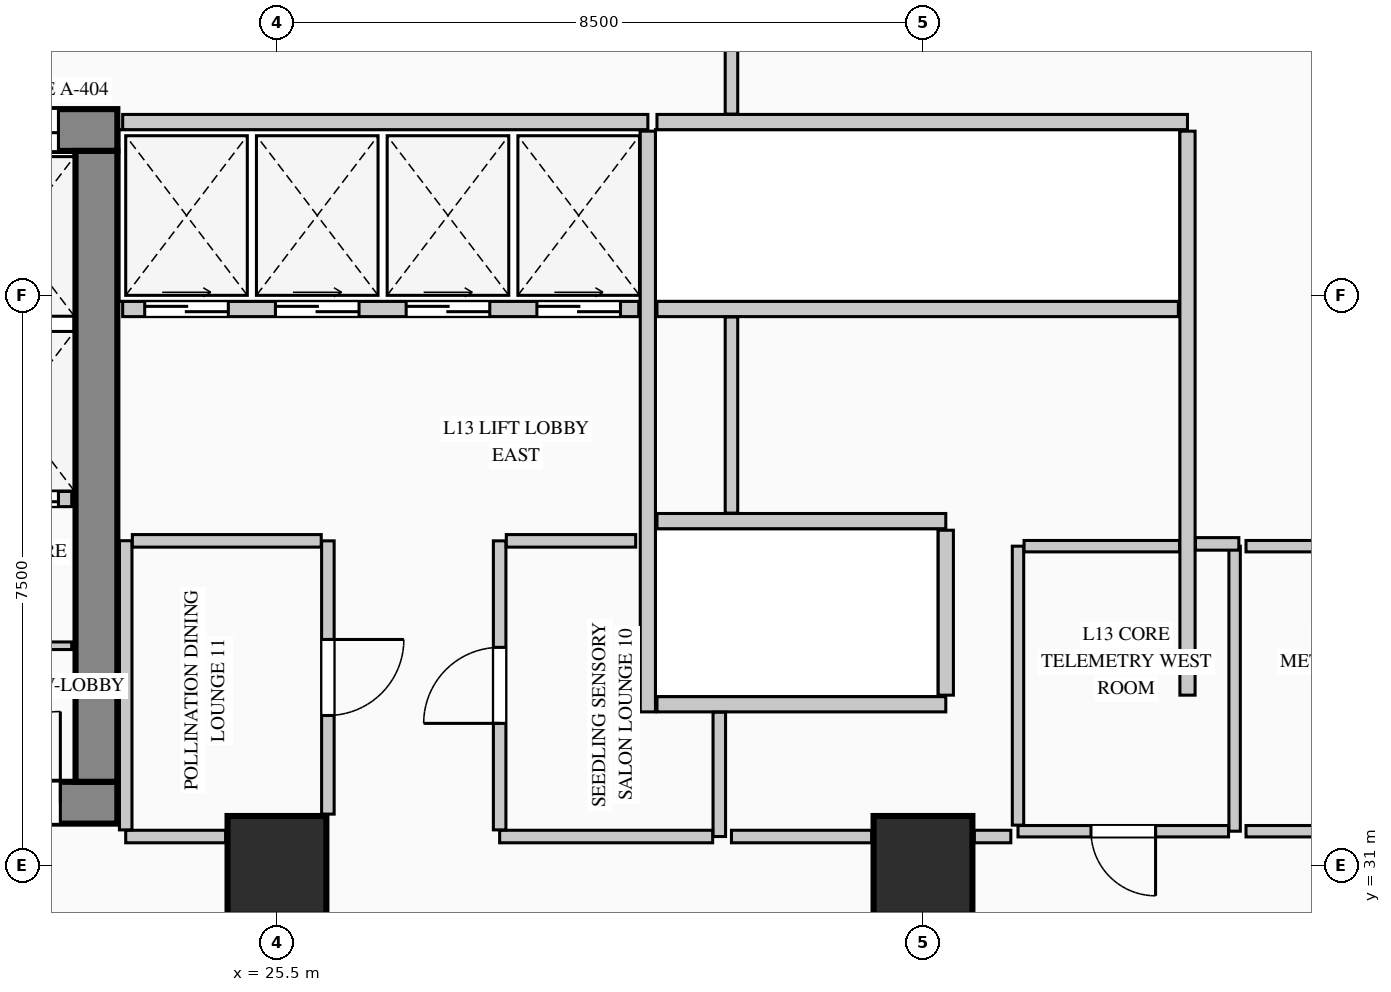
"""IFC4 building model, lengths in metres.
Left out: names, types, materials, properties, quantities, classifications, styles, units other than length and angle.
Written with IfcOpenShell. Run it as: python <this file> out.ifc"""

import sys

from ifc_helpers import new_model, si_unit, direction, frame, frame_2d, origin, origin_2d, place, context, subcontext, project, spatial, rectangle, extrude, element, fill, save


model = new_model("IFC4")
c1 = context("Model", 3, precision=1e-05, world=origin(), true_north=direction((0.0, 1.0)))
c2 = subcontext(c1, "Body", "Model", "MODEL_VIEW")
j1 = project(units=[si_unit("LENGTHUNIT", "METRE"), si_unit("PLANEANGLEUNIT", "RADIAN")], contexts=[c1])
p1 = place(None, origin())
s1 = spatial("IfcSite", under=j1, at=p1, CompositionType="ELEMENT")
p2 = place(p1, origin())
s2 = spatial("IfcBuilding", under=s1, at=p2, CompositionType="ELEMENT")
p3 = place(p2, frame((0.0, 0.0, 57.8)))
s3 = spatial("IfcBuildingStorey", under=s2, at=p3, CompositionType="ELEMENT", Elevation=57.8)
p4 = place(p3, frame((5.45, 40.675, 0.0), z_axis=(0.0, 0.0, 1.0), x_axis=(1.0, 0.0, 0.0)))
e1 = element("IfcWall", 1, at=p4, inside=s3, PredefinedType="SHEAR", context=c2, shape_type="SweptSolid", body=[
    extrude(rectangle(XDim=17.95, YDim=0.55, at=frame_2d((8.975, 0.0))), origin(), (0.0, 0.0, 1.0), 4.4),
])
p5 = place(p4, frame((15.995, 0.0, 0.0)))
e2 = element("IfcOpeningElement", 2, at=p5, cuts=e1, PredefinedType="OPENING", context=c2, shape_type="SweptSolid", body=[
    extrude(rectangle(XDim=1.18, YDim=2.25, at=frame_2d((0.59, 1.125))), frame((0.0, 0.285, 0.0), z_axis=(0.0, -1.0, 0.0), x_axis=(1.0, 0.0, 0.0)), (0.0, 0.0, 1.0), 0.57),
])
p6 = place(p3, frame((5.45, 31.825, 0.0), z_axis=(0.0, 0.0, 1.0), x_axis=(1.0, 0.0, 0.0)))
e3 = element("IfcWall", 3, at=p6, inside=s3, PredefinedType="SHEAR", context=c2, shape_type="SweptSolid", body=[
    extrude(rectangle(XDim=17.95, YDim=0.55, at=frame_2d((8.975, 0.0))), origin(), (0.0, 0.0, 1.0), 4.4),
])
p7 = place(p6, frame((3.2, 0.0, 0.0)))
e4 = element("IfcOpeningElement", 4, at=p7, cuts=e3, PredefinedType="OPENING", context=c2, shape_type="SweptSolid", body=[
    extrude(rectangle(XDim=1.2, YDim=2.2, at=frame_2d((0.6, 1.1))), frame((0.0, 0.285, 0.0), z_axis=(0.0, -1.0, 0.0), x_axis=(1.0, 0.0, 0.0)), (0.0, 0.0, 1.0), 0.57),
])
p8 = place(p6, frame((7.05, 0.0, 0.0)))
e5 = element("IfcOpeningElement", 5, at=p8, cuts=e3, PredefinedType="OPENING", context=c2, shape_type="SweptSolid", body=[
    extrude(rectangle(XDim=1.2, YDim=2.2, at=frame_2d((0.6, 1.1))), frame((0.0, 0.285, 0.0), z_axis=(0.0, -1.0, 0.0), x_axis=(1.0, 0.0, 0.0)), (0.0, 0.0, 1.0), 0.57),
])
p9 = place(p6, frame((8.9, 0.0, 0.0)))
e6 = element("IfcOpeningElement", 6, at=p9, cuts=e3, PredefinedType="OPENING", context=c2, shape_type="SweptSolid", body=[
    extrude(rectangle(XDim=1.15, YDim=2.2, at=frame_2d((0.575, 1.1))), frame((0.0, 0.285, 0.0), z_axis=(0.0, -1.0, 0.0), x_axis=(1.0, 0.0, 0.0)), (0.0, 0.0, 1.0), 0.57),
])
p10 = place(p6, frame((16.0, 0.0, 0.0)))
e7 = element("IfcOpeningElement", 7, at=p10, cuts=e3, PredefinedType="OPENING", context=c2, shape_type="SweptSolid", body=[
    extrude(rectangle(XDim=1.2, YDim=2.2, at=frame_2d((0.6, 1.1))), frame((0.0, 0.285, 0.0), z_axis=(0.0, -1.0, 0.0), x_axis=(1.0, 0.0, 0.0)), (0.0, 0.0, 1.0), 0.57),
])
p11 = place(p3, frame((23.125, 32.1, 0.0), z_axis=(0.0, 0.0, 1.0), x_axis=(0.0, 1.0, 0.0)))
e8 = element("IfcWall", 8, at=p11, inside=s3, PredefinedType="SHEAR", context=c2, shape_type="SweptSolid", body=[
    extrude(rectangle(XDim=8.3, YDim=0.55, at=frame_2d((4.15, 0.0))), origin(), (0.0, 0.0, 1.0), 4.4),
])
for number, where, z_axis, x_axis in (
    (9, (25.5, 31.0, 0.0), (0.0, 0.0, 1.0), (1.0, 0.0, 0.0)),
    (10, (34.0, 31.0, 0.0), (0.0, 0.0, 1.0), (1.0, 0.0, 0.0)),
):
    element("IfcColumn", number, at=place(p3, frame(where, z_axis=z_axis, x_axis=x_axis)), inside=s3, PredefinedType="COLUMN", context=c2, shape_type="SweptSolid", body=[
        extrude(rectangle(XDim=1.3, YDim=1.3, at=origin_2d()), origin(), (0.0, 0.0, 1.0), 4.4),
    ])
p12 = place(p3, frame((21.38, 33.89, 0.0), z_axis=(0.0, 0.0, 1.0), x_axis=(1.0, 0.0, 0.0)))
e11 = element("IfcWall", 11, at=p12, inside=s3, PredefinedType="PARTITIONING", context=c2, shape_type="SweptSolid", body=[
    extrude(rectangle(XDim=1.42, YDim=0.1, at=frame_2d((0.71, 0.0))), origin(), (0.0, 0.0, 1.0), 4.1),
])
p13 = place(p12, frame((0.28, 0.0, 0.0)))
e12 = element("IfcOpeningElement", 12, at=p13, cuts=e11, PredefinedType="OPENING", context=c2, shape_type="SweptSolid", body=[
    extrude(rectangle(XDim=0.85, YDim=2.1, at=frame_2d((0.425, 1.05))), frame((0.0, 0.06, 0.0), z_axis=(0.0, -1.0, 0.0), x_axis=(1.0, 0.0, 0.0)), (0.0, 0.0, 1.0), 0.12),
])
p14 = place(p3, frame((21.3, 35.82, 0.0), z_axis=(0.0, 0.0, 1.0), x_axis=(1.0, 0.0, 0.0)))
e13 = element("IfcWall", 13, at=p14, inside=s3, PredefinedType="PARTITIONING", context=c2, shape_type="SweptSolid", body=[
    extrude(rectangle(XDim=1.5, YDim=0.2, at=frame_2d((0.75, 0.0))), origin(), (0.0, 0.0, 1.0), 4.1),
])
p15 = place(p14, frame((0.145, 0.0, 0.0)))
e14 = element("IfcOpeningElement", 14, at=p15, cuts=e13, PredefinedType="OPENING", context=c2, shape_type="SweptSolid", body=[
    extrude(rectangle(XDim=1.18, YDim=2.25, at=frame_2d((0.59, 1.125))), frame((0.0, 0.11, 0.0), z_axis=(0.0, -1.0, 0.0), x_axis=(1.0, 0.0, 0.0)), (0.0, 0.0, 1.0), 0.22),
])
p16 = place(p3, frame((23.47, 40.78, 0.0), z_axis=(0.0, 0.0, 1.0), x_axis=(1.0, 0.0, 0.0)))
e15 = element("IfcWall", 15, at=p16, inside=s3, PredefinedType="PARTITIONING", context=c2, shape_type="SweptSolid", body=[
    extrude(rectangle(XDim=6.91, YDim=0.2, at=frame_2d((3.455, 0.0))), origin(), (0.0, 0.0, 1.0), 4.1),
])
p17 = place(p3, frame((30.38, 33.02, 0.0), z_axis=(0.0, 0.0, 1.0), x_axis=(0.0, 1.0, 0.0)))
e16 = element("IfcWall", 16, at=p17, inside=s3, PredefinedType="PARTITIONING", context=c2, shape_type="SweptSolid", body=[
    extrude(rectangle(XDim=7.64, YDim=0.2, at=frame_2d((3.82, 0.0))), origin(), (0.0, 0.0, 1.0), 4.1),
])
p18 = place(p3, frame((23.47, 38.32, 0.0), z_axis=(0.0, 0.0, 1.0), x_axis=(1.0, 0.0, 0.0)))
e17 = element("IfcWall", 17, at=p18, inside=s3, PredefinedType="PARTITIONING", context=c2, shape_type="SweptSolid", body=[
    extrude(rectangle(XDim=6.79, YDim=0.2, at=frame_2d((3.395, 0.0))), origin(), (0.0, 0.0, 1.0), 4.1),
])
p19 = place(p18, frame((0.29, 0.0, 0.0)))
e18 = element("IfcOpeningElement", 18, at=p19, cuts=e17, PredefinedType="OPENING", context=c2, shape_type="SweptSolid", body=[
    extrude(rectangle(XDim=1.1, YDim=2.2, at=frame_2d((0.55, 1.1))), frame((0.0, 0.11, 0.0), z_axis=(0.0, -1.0, 0.0), x_axis=(1.0, 0.0, 0.0)), (0.0, 0.0, 1.0), 0.22),
])
p20 = place(p18, frame((2.01, 0.0, 0.0)))
e19 = element("IfcOpeningElement", 19, at=p20, cuts=e17, PredefinedType="OPENING", context=c2, shape_type="SweptSolid", body=[
    extrude(rectangle(XDim=1.1, YDim=2.2, at=frame_2d((0.55, 1.1))), frame((0.0, 0.11, 0.0), z_axis=(0.0, -1.0, 0.0), x_axis=(1.0, 0.0, 0.0)), (0.0, 0.0, 1.0), 0.22),
])
p21 = place(p18, frame((3.73, 0.0, 0.0)))
e20 = element("IfcOpeningElement", 20, at=p21, cuts=e17, PredefinedType="OPENING", context=c2, shape_type="SweptSolid", body=[
    extrude(rectangle(XDim=1.1, YDim=2.2, at=frame_2d((0.55, 1.1))), frame((0.0, 0.11, 0.0), z_axis=(0.0, -1.0, 0.0), x_axis=(1.0, 0.0, 0.0)), (0.0, 0.0, 1.0), 0.22),
])
p22 = place(p18, frame((5.45, 0.0, 0.0)))
e21 = element("IfcOpeningElement", 21, at=p22, cuts=e17, PredefinedType="OPENING", context=c2, shape_type="SweptSolid", body=[
    extrude(rectangle(XDim=1.1, YDim=2.2, at=frame_2d((0.55, 1.1))), frame((0.0, 0.11, 0.0), z_axis=(0.0, -1.0, 0.0), x_axis=(1.0, 0.0, 0.0)), (0.0, 0.0, 1.0), 0.22),
])
p23 = place(p3, frame((30.5, 40.78, 0.0), z_axis=(0.0, 0.0, 1.0), x_axis=(1.0, 0.0, 0.0)))
e22 = element("IfcWall", 22, at=p23, inside=s3, PredefinedType="PARTITIONING", context=c2, shape_type="SweptSolid", body=[
    extrude(rectangle(XDim=6.98, YDim=0.2, at=frame_2d((3.49, 0.0))), origin(), (0.0, 0.0, 1.0), 4.1),
])
p24 = place(p3, frame((37.48, 33.24, 0.0), z_axis=(0.0, 0.0, 1.0), x_axis=(0.0, 1.0, 0.0)))
e23 = element("IfcWall", 23, at=p24, inside=s3, PredefinedType="PARTITIONING", context=c2, shape_type="SweptSolid", body=[
    extrude(rectangle(XDim=7.42, YDim=0.2, at=frame_2d((3.71, 0.0))), origin(), (0.0, 0.0, 1.0), 4.1),
])
p25 = place(p3, frame((30.5, 38.32, 0.0), z_axis=(0.0, 0.0, 1.0), x_axis=(1.0, 0.0, 0.0)))
e24 = element("IfcWall", 24, at=p25, inside=s3, PredefinedType="PARTITIONING", context=c2, shape_type="SweptSolid", body=[
    extrude(rectangle(XDim=6.86, YDim=0.2, at=frame_2d((3.43, 0.0))), origin(), (0.0, 0.0, 1.0), 4.1),
])
for number, where, z_axis, x_axis in (
    (25, (30.5, 35.53, 0.0), (0.0, 0.0, 1.0), (1.0, 0.0, 0.0)),
    (26, (30.5, 33.12, 0.0), (0.0, 0.0, 1.0), (1.0, 0.0, 0.0)),
):
    element("IfcWall", number, at=place(p3, frame(where, z_axis=z_axis, x_axis=x_axis)), inside=s3, PredefinedType="PARTITIONING", context=c2, shape_type="SweptSolid", body=[
        extrude(rectangle(XDim=3.8, YDim=0.2, at=frame_2d((1.9, 0.0))), origin(), (0.0, 0.0, 1.0), 4.1),
    ])
p26 = place(p3, frame((34.3, 33.24, 0.0), z_axis=(0.0, 0.0, 1.0), x_axis=(0.0, 1.0, 0.0)))
e27 = element("IfcWall", 27, at=p26, inside=s3, PredefinedType="PARTITIONING", context=c2, shape_type="SweptSolid", body=[
    extrude(rectangle(XDim=2.17, YDim=0.2, at=frame_2d((1.085, 0.0))), origin(), (0.0, 0.0, 1.0), 4.1),
])
p27 = place(p3, frame((38.1, 35.2, 0.0), z_axis=(0.0, 0.0, 1.0), x_axis=(0.0, -1.0, 0.0)))
e28 = element("IfcWall", 28, at=p27, inside=s3, PredefinedType="PARTITIONING", context=c2, shape_type="SweptSolid", body=[
    extrude(rectangle(XDim=3.75, YDim=0.15, at=frame_2d((1.875, 0.0))), origin(), (0.0, 0.0, 1.0), 4.1),
])
p28 = place(p3, frame((38.02, 31.45, 0.0), z_axis=(0.0, 0.0, 1.0), x_axis=(-1.0, 0.0, 0.0)))
e29 = element("IfcWall", 29, at=p28, inside=s3, PredefinedType="PARTITIONING", context=c2, shape_type="SweptSolid", body=[
    extrude(rectangle(XDim=2.77, YDim=0.15, at=frame_2d((1.385, 0.0))), origin(), (0.0, 0.0, 1.0), 4.1),
])
p29 = place(p28, frame((0.96, 0.0, 0.0)))
e30 = element("IfcOpeningElement", 30, at=p29, cuts=e29, PredefinedType="OPENING", context=c2, shape_type="SweptSolid", body=[
    extrude(rectangle(XDim=0.85, YDim=2.1, at=frame_2d((0.425, 1.05))), frame((0.0, 0.085, 0.0), z_axis=(0.0, -1.0, 0.0), x_axis=(1.0, 0.0, 0.0)), (0.0, 0.0, 1.0), 0.17),
])
p30 = place(p3, frame((35.25, 31.53, 0.0), z_axis=(0.0, 0.0, 1.0), x_axis=(0.0, 1.0, 0.0)))
e31 = element("IfcWall", 31, at=p30, inside=s3, PredefinedType="PARTITIONING", context=c2, shape_type="SweptSolid", body=[
    extrude(rectangle(XDim=3.67, YDim=0.15, at=frame_2d((1.835, 0.0))), origin(), (0.0, 0.0, 1.0), 4.1),
])
p31 = place(p3, frame((35.33, 35.2, 0.0), z_axis=(0.0, 0.0, 1.0), x_axis=(1.0, 0.0, 0.0)))
e32 = element("IfcWall", 32, at=p31, inside=s3, PredefinedType="PARTITIONING", context=c2, shape_type="SweptSolid", body=[
    extrude(rectangle(XDim=2.045, YDim=0.15, at=frame_2d((1.022, 0.0))), origin(), (0.0, 0.0, 1.0), 4.1),
])
p32 = place(p3, frame((41.07, 31.45, 0.0), z_axis=(0.0, 0.0, 1.0), x_axis=(-1.0, 0.0, 0.0)))
e33 = element("IfcWall", 33, at=p32, inside=s3, PredefinedType="PARTITIONING", context=c2, shape_type="SweptSolid", body=[
    extrude(rectangle(XDim=2.82, YDim=0.15, at=frame_2d((1.41, 0.0))), origin(), (0.0, 0.0, 1.0), 4.1),
])
p33 = place(p32, frame((0.985, 0.0, 0.0)))
e34 = element("IfcOpeningElement", 34, at=p33, cuts=e33, PredefinedType="OPENING", context=c2, shape_type="SweptSolid", body=[
    extrude(rectangle(XDim=0.85, YDim=2.1, at=frame_2d((0.425, 1.05))), frame((0.0, 0.085, 0.0), z_axis=(0.0, -1.0, 0.0), x_axis=(1.0, 0.0, 0.0)), (0.0, 0.0, 1.0), 0.17),
])
p34 = place(p3, frame((38.25, 35.2, 0.0), z_axis=(0.0, 0.0, 1.0), x_axis=(1.0, 0.0, 0.0)))
e35 = element("IfcWall", 35, at=p34, inside=s3, PredefinedType="PARTITIONING", context=c2, shape_type="SweptSolid", body=[
    extrude(rectangle(XDim=2.82, YDim=0.15, at=frame_2d((1.41, 0.0))), origin(), (0.0, 0.0, 1.0), 4.1),
])
p35 = place(p3, frame((31.32, 33.015, 0.0), z_axis=(0.0, 0.0, 1.0), x_axis=(0.0, -1.0, 0.0)))
e36 = element("IfcWall", 36, at=p35, inside=s3, PredefinedType="PARTITIONING", context=c2, shape_type="SweptSolid", body=[
    extrude(rectangle(XDim=1.635, YDim=0.165, at=frame_2d((0.817, 0.0))), origin(), (0.0, 0.0, 1.0), 4.1),
])
p36 = place(p3, frame((31.232, 31.38, 0.0), z_axis=(0.0, 0.0, 1.0), x_axis=(-1.0, 0.0, 0.0)))
e37 = element("IfcWall", 37, at=p36, inside=s3, PredefinedType="PARTITIONING", context=c2, shape_type="SweptSolid", body=[
    extrude(rectangle(XDim=2.802, YDim=0.165, at=frame_2d((1.401, 0.0))), origin(), (0.0, 0.0, 1.0), 4.1),
])
p37 = place(p3, frame((28.43, 31.468, 0.0), z_axis=(0.0, 0.0, 1.0), x_axis=(0.0, 1.0, 0.0)))
e38 = element("IfcWall", 38, at=p37, inside=s3, PredefinedType="PARTITIONING", context=c2, shape_type="SweptSolid", body=[
    extrude(rectangle(XDim=3.802, YDim=0.165, at=frame_2d((1.901, 0.0))), origin(), (0.0, 0.0, 1.0), 4.1),
])
p38 = place(p37, frame((1.401, 0.0, 0.0)))
e39 = element("IfcOpeningElement", 39, at=p38, cuts=e38, PredefinedType="OPENING", context=c2, shape_type="SweptSolid", body=[
    extrude(rectangle(XDim=1.0, YDim=2.15, at=frame_2d((0.5, 1.075))), frame((0.0, 0.093, 0.0), z_axis=(0.0, -1.0, 0.0), x_axis=(1.0, 0.0, 0.0)), (0.0, 0.0, 1.0), 0.185),
])
p39 = place(p3, frame((28.518, 35.27, 0.0), z_axis=(0.0, 0.0, 1.0), x_axis=(1.0, 0.0, 0.0)))
e40 = element("IfcWall", 40, at=p39, inside=s3, PredefinedType="PARTITIONING", context=c2, shape_type="SweptSolid", body=[
    extrude(rectangle(XDim=1.702, YDim=0.165, at=frame_2d((0.851, 0.0))), origin(), (0.0, 0.0, 1.0), 4.1),
])
p40 = place(p3, frame((26.17, 35.27, 0.0), z_axis=(0.0, 0.0, 1.0), x_axis=(0.0, -1.0, 0.0)))
e41 = element("IfcWall", 41, at=p40, inside=s3, PredefinedType="PARTITIONING", context=c2, shape_type="SweptSolid", body=[
    extrude(rectangle(XDim=3.595, YDim=0.165, at=frame_2d((1.797, 0.0))), origin(), (0.0, 0.0, 1.0), 4.1),
])
p41 = place(p40, frame((1.298, 0.0, 0.0)))
e42 = element("IfcOpeningElement", 42, at=p41, cuts=e41, PredefinedType="OPENING", context=c2, shape_type="SweptSolid", body=[
    extrude(rectangle(XDim=1.0, YDim=2.15, at=frame_2d((0.5, 1.075))), frame((0.0, 0.093, 0.0), z_axis=(0.0, -1.0, 0.0), x_axis=(1.0, 0.0, 0.0)), (0.0, 0.0, 1.0), 0.185),
])
p42 = place(p3, frame((24.825, 31.38, 0.0), z_axis=(0.0, 0.0, 1.0), x_axis=(-1.0, 0.0, 0.0)))
e43 = element("IfcWall", 43, at=p42, inside=s3, PredefinedType="PARTITIONING", context=c2, shape_type="SweptSolid", body=[
    extrude(rectangle(XDim=1.315, YDim=0.165, at=frame_2d((0.657, 0.0))), origin(), (0.0, 0.0, 1.0), 4.1),
])
p43 = place(p3, frame((23.51, 31.468, 0.0), z_axis=(0.0, 0.0, 1.0), x_axis=(0.0, 1.0, 0.0)))
e44 = element("IfcWall", 44, at=p43, inside=s3, PredefinedType="PARTITIONING", context=c2, shape_type="SweptSolid", body=[
    extrude(rectangle(XDim=3.804, YDim=0.165, at=frame_2d((1.902, 0.0))), origin(), (0.0, 0.0, 1.0), 4.1),
])
p44 = place(p3, frame((23.597, 35.27, 0.0), z_axis=(0.0, 0.0, 1.0), x_axis=(1.0, 0.0, 0.0)))
e45 = element("IfcWall", 45, at=p44, inside=s3, PredefinedType="PARTITIONING", context=c2, shape_type="SweptSolid", body=[
    extrude(rectangle(XDim=2.485, YDim=0.165, at=frame_2d((1.243, 0.0))), origin(), (0.0, 0.0, 1.0), 4.1),
])
p45 = place(p3, frame((31.48, 35.635, 0.0), z_axis=(0.0, 0.0, 1.0), x_axis=(0.0, 1.0, 0.0)))
e46 = element("IfcWall", 46, at=p45, inside=s3, PredefinedType="PARTITIONING", context=c2, shape_type="SweptSolid", body=[
    extrude(rectangle(XDim=2.58, YDim=0.165, at=frame_2d((1.29, 0.0))), origin(), (0.0, 0.0, 1.0), 4.1),
])
p46 = place(p3, frame((31.48, 40.885, 0.0), z_axis=(0.0, 0.0, 1.0), x_axis=(0.0, 1.0, 0.0)))
e47 = element("IfcWall", 47, at=p46, inside=s3, PredefinedType="PARTITIONING", context=c2, shape_type="SweptSolid", body=[
    extrude(rectangle(XDim=2.33, YDim=0.165, at=frame_2d((1.165, 0.0))), origin(), (0.0, 0.0, 1.0), 4.1),
])
p47 = place(p3, frame((38.156, 35.23, 0.0), z_axis=(0.0, 0.0, 1.0), x_axis=(-1.0, 0.0, 0.0)))
e48 = element("IfcWall", 48, at=p47, inside=s3, PredefinedType="PARTITIONING", context=c2, shape_type="SweptSolid", body=[
    extrude(rectangle(XDim=0.571, YDim=0.165, at=frame_2d((0.285, 0.0))), origin(), (0.0, 0.0, 1.0), 4.1),
])
p48 = place(p3, frame((35.156, 31.38, 0.0), z_axis=(0.0, 0.0, 1.0), x_axis=(-1.0, 0.0, 0.0)))
e49 = element("IfcWall", 49, at=p48, inside=s3, PredefinedType="PARTITIONING", context=c2, shape_type="SweptSolid", body=[
    extrude(rectangle(XDim=0.48, YDim=0.165, at=frame_2d((0.24, 0.0))), origin(), (0.0, 0.0, 1.0), 4.1),
])
p49 = place(p3, frame((33.325, 31.38, 0.0), z_axis=(0.0, 0.0, 1.0), x_axis=(-1.0, 0.0, 0.0)))
e50 = element("IfcWall", 50, at=p49, inside=s3, PredefinedType="PARTITIONING", context=c2, shape_type="SweptSolid", body=[
    extrude(rectangle(XDim=1.845, YDim=0.165, at=frame_2d((0.922, 0.0))), origin(), (0.0, 0.0, 1.0), 4.1),
])
p50 = place(p10, origin())
e51 = element("IfcDoor", 51, at=p50, inside=s3, OperationType="SINGLE_SWING_RIGHT", PredefinedType="DOOR", context=c2, shape_type="SweptSolid", body=[
    extrude(rectangle(XDim=1.2, YDim=2.2, at=frame_2d((0.6, 1.1))), frame((0.0, 0.025, 0.0), z_axis=(0.0, -1.0, 0.0), x_axis=(1.0, 0.0, 0.0)), (0.0, 0.0, 1.0), 0.05),
])
fill(e7, e51)
p51 = place(p5, origin())
e52 = element("IfcDoor", 52, at=p51, inside=s3, OperationType="DOUBLE_DOOR_SLIDING", PredefinedType="DOOR", context=c2, shape_type="SweptSolid", body=[
    extrude(rectangle(XDim=1.18, YDim=2.25, at=frame_2d((0.59, 1.125))), frame((0.0, 0.025, 0.0), z_axis=(0.0, -1.0, 0.0), x_axis=(1.0, 0.0, 0.0)), (0.0, 0.0, 1.0), 0.05),
])
fill(e2, e52)
p52 = place(p15, origin())
e53 = element("IfcDoor", 53, at=p52, inside=s3, OperationType="DOUBLE_DOOR_SLIDING", PredefinedType="DOOR", context=c2, shape_type="SweptSolid", body=[
    extrude(rectangle(XDim=1.18, YDim=2.25, at=frame_2d((0.59, 1.125))), frame((0.0, 0.025, 0.0), z_axis=(0.0, -1.0, 0.0), x_axis=(1.0, 0.0, 0.0)), (0.0, 0.0, 1.0), 0.05),
])
fill(e14, e53)
p53 = place(p19, origin())
e54 = element("IfcDoor", 54, at=p53, inside=s3, OperationType="DOUBLE_DOOR_SLIDING", PredefinedType="DOOR", context=c2, shape_type="SweptSolid", body=[
    extrude(rectangle(XDim=1.1, YDim=2.2, at=frame_2d((0.55, 1.1))), frame((0.0, 0.025, 0.0), z_axis=(0.0, -1.0, 0.0), x_axis=(1.0, 0.0, 0.0)), (0.0, 0.0, 1.0), 0.05),
])
fill(e18, e54)
p54 = place(p20, origin())
e55 = element("IfcDoor", 55, at=p54, inside=s3, OperationType="DOUBLE_DOOR_SLIDING", PredefinedType="DOOR", context=c2, shape_type="SweptSolid", body=[
    extrude(rectangle(XDim=1.1, YDim=2.2, at=frame_2d((0.55, 1.1))), frame((0.0, 0.025, 0.0), z_axis=(0.0, -1.0, 0.0), x_axis=(1.0, 0.0, 0.0)), (0.0, 0.0, 1.0), 0.05),
])
fill(e19, e55)
p55 = place(p21, origin())
e56 = element("IfcDoor", 56, at=p55, inside=s3, OperationType="DOUBLE_DOOR_SLIDING", PredefinedType="DOOR", context=c2, shape_type="SweptSolid", body=[
    extrude(rectangle(XDim=1.1, YDim=2.2, at=frame_2d((0.55, 1.1))), frame((0.0, 0.025, 0.0), z_axis=(0.0, -1.0, 0.0), x_axis=(1.0, 0.0, 0.0)), (0.0, 0.0, 1.0), 0.05),
])
fill(e20, e56)
p56 = place(p22, origin())
e57 = element("IfcDoor", 57, at=p56, inside=s3, OperationType="DOUBLE_DOOR_SLIDING", PredefinedType="DOOR", context=c2, shape_type="SweptSolid", body=[
    extrude(rectangle(XDim=1.1, YDim=2.2, at=frame_2d((0.55, 1.1))), frame((0.0, 0.025, 0.0), z_axis=(0.0, -1.0, 0.0), x_axis=(1.0, 0.0, 0.0)), (0.0, 0.0, 1.0), 0.05),
])
fill(e21, e57)
p57 = place(p29, origin())
e58 = element("IfcDoor", 58, at=p57, inside=s3, OperationType="SINGLE_SWING_LEFT", PredefinedType="DOOR", context=c2, shape_type="SweptSolid", body=[
    extrude(rectangle(XDim=0.85, YDim=2.1, at=frame_2d((0.425, 1.05))), frame((0.0, 0.025, 0.0), z_axis=(0.0, -1.0, 0.0), x_axis=(1.0, 0.0, 0.0)), (0.0, 0.0, 1.0), 0.05),
])
fill(e30, e58)
p58 = place(p38, origin())
e59 = element("IfcDoor", 59, at=p58, inside=s3, OperationType="SINGLE_SWING_LEFT", PredefinedType="DOOR", context=c2, shape_type="SweptSolid", body=[
    extrude(rectangle(XDim=1.0, YDim=2.15, at=frame_2d((0.5, 1.075))), frame((0.0, 0.025, 0.0), z_axis=(0.0, -1.0, 0.0), x_axis=(1.0, 0.0, 0.0)), (0.0, 0.0, 1.0), 0.05),
])
fill(e39, e59)
p59 = place(p41, origin())
e60 = element("IfcDoor", 60, at=p59, inside=s3, OperationType="SINGLE_SWING_LEFT", PredefinedType="DOOR", context=c2, shape_type="SweptSolid", body=[
    extrude(rectangle(XDim=1.0, YDim=2.15, at=frame_2d((0.5, 1.075))), frame((0.0, 0.025, 0.0), z_axis=(0.0, -1.0, 0.0), x_axis=(1.0, 0.0, 0.0)), (0.0, 0.0, 1.0), 0.05),
])
fill(e42, e60)
save(model, sys.argv[1])
